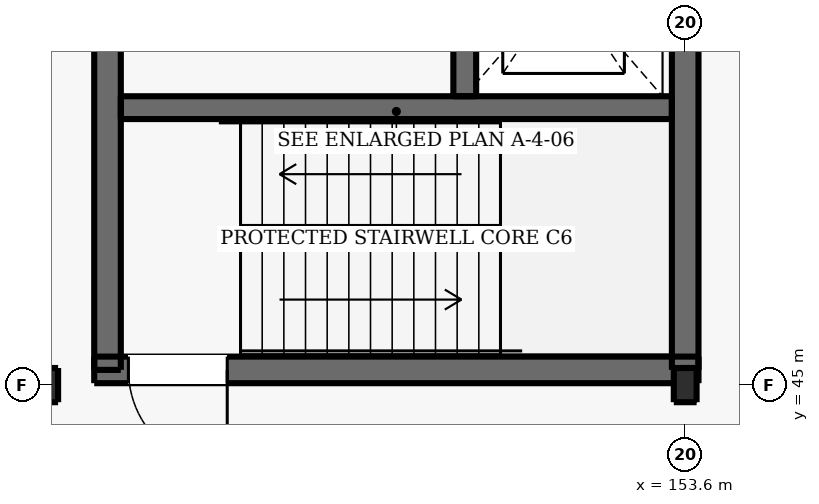
"""IFC4 building model, lengths in metres.
Left out: names, types, materials, properties, quantities, classifications, styles, units other than length and angle.
Written with IfcOpenShell. Run it as: python <this file> out.ifc"""

import sys

from ifc_helpers import new_model, si_unit, direction, frame, frame_2d, origin, origin_2d, place, context, subcontext, project, spatial, rectangle, i_section, extrude, element, fill, save


model = new_model("IFC4")
c1 = context("Model", 3, precision=1e-05, world=origin(), true_north=direction((0.0, 1.0)))
c2 = subcontext(c1, "Body", "Model", "MODEL_VIEW")
j1 = project(units=[si_unit("LENGTHUNIT", "METRE"), si_unit("PLANEANGLEUNIT", "RADIAN")], contexts=[c1])
p1 = place(None, origin())
s1 = spatial("IfcSite", under=j1, at=p1, CompositionType="ELEMENT")
p2 = place(p1, origin())
s2 = spatial("IfcBuilding", under=s1, at=p2, CompositionType="ELEMENT")
p3 = place(p2, frame((0.0, 0.0, 5.1)))
s3 = spatial("IfcBuildingStorey", under=s2, at=p3, CompositionType="ELEMENT", Elevation=5.1)
for number, where, z_axis, x_axis in (
    (1, (145.2, 45.0, 0.0), (0.0, 0.0, 1.0), (1.0, 0.0, 0.0)),
    (2, (153.6, 45.0, 0.0), (0.0, 0.0, 1.0), (1.0, 0.0, 0.0)),
):
    element("IfcColumn", number, at=place(p3, frame(where, z_axis=z_axis, x_axis=x_axis)), inside=s3, PredefinedType="COLUMN", context=c2, shape_type="SweptSolid", body=[
        extrude(i_section(OverallWidth=0.3, OverallDepth=0.45, WebThickness=0.014, FlangeThickness=0.026, FilletRadius=0.027, at=origin_2d()), origin(), (0.0, 0.0, 1.0), 4.5),
    ])
p4 = place(p3, frame((145.825, 45.2, 0.0), z_axis=(0.0, 0.0, 1.0), x_axis=(1.0, 0.0, 0.0)))
e3 = element("IfcWall", 3, at=p4, inside=s3, PredefinedType="SHEAR", context=c2, shape_type="SweptSolid", body=[
    extrude(rectangle(XDim=7.95, YDim=0.35, at=frame_2d((3.975, 0.0))), origin(), (0.0, 0.0, 1.0), 4.5),
])
p5 = place(p4, frame((0.45, 0.0, 0.0)))
e4 = element("IfcOpeningElement", 4, at=p5, cuts=e3, PredefinedType="OPENING", context=c2, shape_type="SweptSolid", body=[
    extrude(rectangle(XDim=1.3, YDim=2.15, at=frame_2d((0.65, 1.075))), frame((0.0, 0.185, 0.0), z_axis=(0.0, -1.0, 0.0), x_axis=(1.0, 0.0, 0.0)), (0.0, 0.0, 1.0), 0.37),
])
for number, where, z_axis, x_axis in (
    (5, (146.0, 45.2, 0.0), (0.0, 0.0, 1.0), (0.0, 1.0, 0.0)),
    (6, (153.6, 45.2, 0.0), (0.0, 0.0, 1.0), (0.0, 1.0, 0.0)),
):
    element("IfcWall", number, at=place(p3, frame(where, z_axis=z_axis, x_axis=x_axis)), inside=s3, PredefinedType="SHEAR", context=c2, shape_type="SweptSolid", body=[
        extrude(rectangle(XDim=6.8, YDim=0.35, at=frame_2d((3.4, 0.0))), origin(), (0.0, 0.0, 1.0), 4.5),
    ])
p6 = place(p3, frame((146.175, 48.65, 0.0), z_axis=(0.0, 0.0, 1.0), x_axis=(1.0, 0.0, 0.0)))
e7 = element("IfcWall", 7, at=p6, inside=s3, PredefinedType="SHEAR", context=c2, shape_type="SweptSolid", body=[
    extrude(rectangle(XDim=7.25, YDim=0.3, at=frame_2d((3.625, 0.0))), origin(), (0.0, 0.0, 1.0), 4.5),
])
p7 = place(p3, frame((150.7, 48.8, 0.0), z_axis=(0.0, 0.0, 1.0), x_axis=(0.0, 1.0, 0.0)))
e8 = element("IfcWall", 8, at=p7, inside=s3, PredefinedType="SHEAR", context=c2, shape_type="SweptSolid", body=[
    extrude(rectangle(XDim=3.025, YDim=0.3, at=frame_2d((1.512, 0.0))), origin(), (0.0, 0.0, 1.0), 4.5),
])
p8 = place(p7, frame((0.963, 0.0, 0.0)))
e9 = element("IfcOpeningElement", 9, at=p8, cuts=e8, PredefinedType="OPENING", context=c2, shape_type="SweptSolid", body=[
    extrude(rectangle(XDim=1.1, YDim=2.15, at=frame_2d((0.55, 1.075))), frame((0.0, 0.16, 0.0), z_axis=(0.0, -1.0, 0.0), x_axis=(1.0, 0.0, 0.0)), (0.0, 0.0, 1.0), 0.32),
])
p9 = place(p5, frame((1.3, 0.0, 0.0), z_axis=(0.0, 0.0, 1.0), x_axis=(-1.0, 0.0, 0.0)))
e10 = element("IfcDoor", 10, at=p9, inside=s3, OperationType="SINGLE_SWING_RIGHT", PredefinedType="DOOR", context=c2, shape_type="SweptSolid", body=[
    extrude(rectangle(XDim=1.3, YDim=2.15, at=frame_2d((0.65, 1.075))), frame((0.0, 0.025, 0.0), z_axis=(0.0, -1.0, 0.0), x_axis=(1.0, 0.0, 0.0)), (0.0, 0.0, 1.0), 0.05),
])
fill(e4, e10)
save(model, sys.argv[1])
